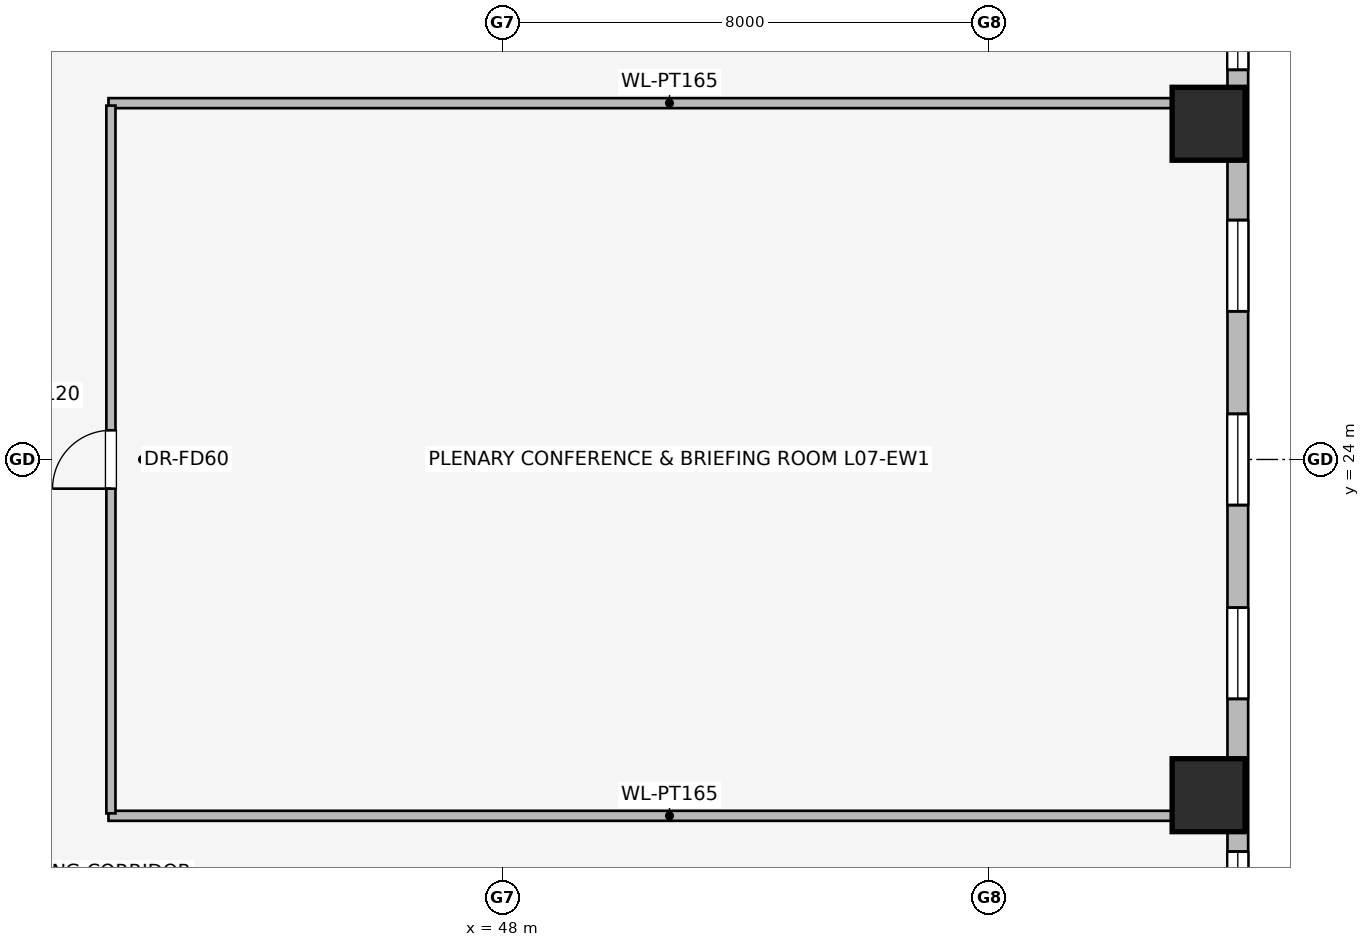
"""IFC4 building model, lengths in metres.
Left out: names, types, materials, properties, quantities, classifications, styles, units other than length and angle.
Written with IfcOpenShell. Run it as: python <this file> out.ifc"""

import sys

from ifc_helpers import new_model, si_unit, direction, frame, frame_2d, origin, origin_2d, place, context, subcontext, project, spatial, rectangle, extrude, element, fill, save


model = new_model("IFC4")
c1 = context("Model", 3, precision=1e-05, world=origin(), true_north=direction((0.0, 1.0)))
c2 = subcontext(c1, "Body", "Model", "MODEL_VIEW")
j1 = project(units=[si_unit("LENGTHUNIT", "METRE"), si_unit("PLANEANGLEUNIT", "RADIAN")], contexts=[c1])
p1 = place(None, origin())
s1 = spatial("IfcSite", under=j1, at=p1, CompositionType="ELEMENT")
p2 = place(p1, origin())
s2 = spatial("IfcBuilding", under=s1, at=p2, CompositionType="ELEMENT")
p3 = place(p2, frame((0.0, 0.0, 30.65)))
s3 = spatial("IfcBuildingStorey", under=s2, at=p3, CompositionType="ELEMENT", Elevation=30.65)
for number, where, z_axis, x_axis in (
    (1, (59.613, 18.479, 0.0), (0.0, 0.0, 1.0), (1.0, 0.0, 0.0)),
    (2, (59.613, 29.521, 0.0), (0.0, 0.0, 1.0), (1.0, 0.0, 0.0)),
):
    element("IfcColumn", number, at=place(p3, frame(where, z_axis=z_axis, x_axis=x_axis)), inside=s3, PredefinedType="COLUMN", context=c2, shape_type="SweptSolid", body=[
        extrude(rectangle(XDim=1.2, YDim=1.2, at=origin_2d()), origin(), (0.0, 0.0, 1.0), 3.65),
    ])
p4 = place(p3, frame((60.093, 33.202, 0.0), z_axis=(0.0, 0.0, 1.0), x_axis=(0.0, -1.0, 0.0)))
e3 = element("IfcWall", 3, at=p4, inside=s3, PredefinedType="STANDARD", context=c2, shape_type="SweptSolid", body=[
    extrude(rectangle(XDim=18.404, YDim=0.34, at=frame_2d((9.202, 0.0))), origin(), (0.0, 0.0, 1.0), 2.684),
])
p5 = place(p4, frame((1.744, 0.0, 0.75)))
e4 = element("IfcOpeningElement", 4, at=p5, cuts=e3, PredefinedType="OPENING", context=c2, shape_type="SweptSolid", body=[
    extrude(rectangle(XDim=1.05, YDim=1.4, at=frame_2d((0.525, 0.7))), frame((0.0, 0.18, 0.0), z_axis=(0.0, -1.0, 0.0), x_axis=(1.0, 0.0, 0.0)), (0.0, 0.0, 1.0), 0.36),
])
p6 = place(p4, frame((5.265, 0.0, 0.75)))
e5 = element("IfcOpeningElement", 5, at=p6, cuts=e3, PredefinedType="OPENING", context=c2, shape_type="SweptSolid", body=[
    extrude(rectangle(XDim=1.5, YDim=1.5, at=frame_2d((0.75, 0.75))), frame((0.0, 0.18, 0.0), z_axis=(0.0, -1.0, 0.0), x_axis=(1.0, 0.0, 0.0)), (0.0, 0.0, 1.0), 0.36),
])
p7 = place(p4, frame((8.452, 0.0, 0.75)))
e6 = element("IfcOpeningElement", 6, at=p7, cuts=e3, PredefinedType="OPENING", context=c2, shape_type="SweptSolid", body=[
    extrude(rectangle(XDim=1.5, YDim=1.5, at=frame_2d((0.75, 0.75))), frame((0.0, 0.18, 0.0), z_axis=(0.0, -1.0, 0.0), x_axis=(1.0, 0.0, 0.0)), (0.0, 0.0, 1.0), 0.36),
])
p8 = place(p4, frame((11.639, 0.0, 0.75)))
e7 = element("IfcOpeningElement", 7, at=p8, cuts=e3, PredefinedType="OPENING", context=c2, shape_type="SweptSolid", body=[
    extrude(rectangle(XDim=1.5, YDim=1.5, at=frame_2d((0.75, 0.75))), frame((0.0, 0.18, 0.0), z_axis=(0.0, -1.0, 0.0), x_axis=(1.0, 0.0, 0.0)), (0.0, 0.0, 1.0), 0.36),
])
p9 = place(p4, frame((15.65, 0.0, 0.75)))
e8 = element("IfcOpeningElement", 8, at=p9, cuts=e3, PredefinedType="OPENING", context=c2, shape_type="SweptSolid", body=[
    extrude(rectangle(XDim=1.05, YDim=1.4, at=frame_2d((0.525, 0.7))), frame((0.0, 0.18, 0.0), z_axis=(0.0, -1.0, 0.0), x_axis=(1.0, 0.0, 0.0)), (0.0, 0.0, 1.0), 0.36),
])
for number, where, z_axis, x_axis in (
    (9, (41.52, 18.14, 0.0), (0.0, 0.0, 1.0), (1.0, 0.0, 0.0)),
    (10, (41.52, 29.86, 0.0), (0.0, 0.0, 1.0), (1.0, 0.0, 0.0)),
):
    element("IfcWall", number, at=place(p3, frame(where, z_axis=z_axis, x_axis=x_axis)), inside=s3, PredefinedType="PARTITIONING", context=c2, shape_type="SweptSolid", body=[
        extrude(rectangle(XDim=18.453, YDim=0.165, at=frame_2d((9.227, 0.0))), origin(), (0.0, 0.0, 1.0), 3.39),
    ])
p10 = place(p3, frame((41.56, 18.18, 0.0), z_axis=(0.0, 0.0, 1.0), x_axis=(0.0, 1.0, 0.0)))
e11 = element("IfcWall", 11, at=p10, inside=s3, PredefinedType="PARTITIONING", context=c2, shape_type="SweptSolid", body=[
    extrude(rectangle(XDim=11.64, YDim=0.15, at=frame_2d((5.82, 0.0))), origin(), (0.0, 0.0, 1.0), 3.39),
])
p11 = place(p10, frame((5.34, 0.0, 0.0)))
e12 = element("IfcOpeningElement", 12, at=p11, cuts=e11, PredefinedType="OPENING", context=c2, shape_type="SweptSolid", body=[
    extrude(rectangle(XDim=0.96, YDim=2.0, at=frame_2d((0.48, 1.0))), frame((0.0, 0.085, 0.0), z_axis=(0.0, -1.0, 0.0), x_axis=(1.0, 0.0, 0.0)), (0.0, 0.0, 1.0), 0.17),
])
p12 = place(p5, origin())
e13 = element("IfcWindow", 13, at=p12, inside=s3, PartitioningType="SINGLE_PANEL", PredefinedType="WINDOW", context=c2, shape_type="SweptSolid", body=[
    extrude(rectangle(XDim=1.05, YDim=1.4, at=frame_2d((0.525, 0.7))), frame((0.0, 0.03, 0.0), z_axis=(0.0, -1.0, 0.0), x_axis=(1.0, 0.0, 0.0)), (0.0, 0.0, 1.0), 0.06),
])
fill(e4, e13)
p13 = place(p6, origin())
e14 = element("IfcWindow", 14, at=p13, inside=s3, PartitioningType="SINGLE_PANEL", PredefinedType="WINDOW", context=c2, shape_type="SweptSolid", body=[
    extrude(rectangle(XDim=1.5, YDim=1.5, at=frame_2d((0.75, 0.75))), frame((0.0, 0.03, 0.0), z_axis=(0.0, -1.0, 0.0), x_axis=(1.0, 0.0, 0.0)), (0.0, 0.0, 1.0), 0.06),
])
fill(e5, e14)
p14 = place(p7, origin())
e15 = element("IfcWindow", 15, at=p14, inside=s3, PartitioningType="SINGLE_PANEL", PredefinedType="WINDOW", context=c2, shape_type="SweptSolid", body=[
    extrude(rectangle(XDim=1.5, YDim=1.5, at=frame_2d((0.75, 0.75))), frame((0.0, 0.03, 0.0), z_axis=(0.0, -1.0, 0.0), x_axis=(1.0, 0.0, 0.0)), (0.0, 0.0, 1.0), 0.06),
])
fill(e6, e15)
p15 = place(p8, origin())
e16 = element("IfcWindow", 16, at=p15, inside=s3, PartitioningType="SINGLE_PANEL", PredefinedType="WINDOW", context=c2, shape_type="SweptSolid", body=[
    extrude(rectangle(XDim=1.5, YDim=1.5, at=frame_2d((0.75, 0.75))), frame((0.0, 0.03, 0.0), z_axis=(0.0, -1.0, 0.0), x_axis=(1.0, 0.0, 0.0)), (0.0, 0.0, 1.0), 0.06),
])
fill(e7, e16)
p16 = place(p9, origin())
e17 = element("IfcWindow", 17, at=p16, inside=s3, PartitioningType="SINGLE_PANEL", PredefinedType="WINDOW", context=c2, shape_type="SweptSolid", body=[
    extrude(rectangle(XDim=1.05, YDim=1.4, at=frame_2d((0.525, 0.7))), frame((0.0, 0.03, 0.0), z_axis=(0.0, -1.0, 0.0), x_axis=(1.0, 0.0, 0.0)), (0.0, 0.0, 1.0), 0.06),
])
fill(e8, e17)
p17 = place(p11, origin())
e18 = element("IfcDoor", 18, at=p17, inside=s3, OperationType="SINGLE_SWING_LEFT", PredefinedType="DOOR", context=c2, shape_type="SweptSolid", body=[
    extrude(rectangle(XDim=0.96, YDim=2.0, at=frame_2d((0.48, 1.0))), frame((0.0, 0.025, 0.0), z_axis=(0.0, -1.0, 0.0), x_axis=(1.0, 0.0, 0.0)), (0.0, 0.0, 1.0), 0.05),
])
fill(e12, e18)
save(model, sys.argv[1])
